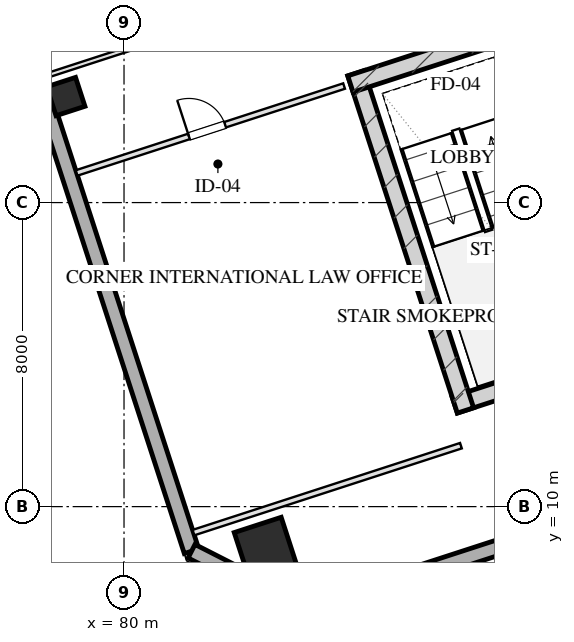
"""IFC4 building model, lengths in metres.
Left out: names, types, materials, properties, quantities, classifications, styles, units other than length and angle.
Written with IfcOpenShell. Run it as: python <this file> out.ifc"""

import sys

from ifc_helpers import new_model, si_unit, direction, frame, frame_2d, origin, origin_2d, place, context, subcontext, project, spatial, rectangle, hollow_rectangle, extrude, element, fill, save


model = new_model("IFC4")
c1 = context("Model", 3, precision=1e-05, world=origin(), true_north=direction((0.0, 1.0)))
c2 = subcontext(c1, "Body", "Model", "MODEL_VIEW")
j1 = project(units=[si_unit("LENGTHUNIT", "METRE"), si_unit("PLANEANGLEUNIT", "RADIAN")], contexts=[c1])
p1 = place(None, origin())
s1 = spatial("IfcSite", under=j1, at=p1, CompositionType="ELEMENT")
p2 = place(p1, origin())
s2 = spatial("IfcBuilding", under=s1, at=p2, CompositionType="ELEMENT")
p3 = place(p2, frame((0.0, 0.0, 192.05)))
s3 = spatial("IfcBuildingStorey", under=s2, at=p3, CompositionType="ELEMENT", Elevation=192.05)
p4 = place(p3, frame((88.701, 12.675, 0.0), z_axis=(0.0, 0.0, 1.0), x_axis=(0.95105824505, 0.309011673763, 0.0)))
e1 = element("IfcWall", 1, at=p4, inside=s3, PredefinedType="SHEAR", context=c2, shape_type="SweptSolid", body=[
    extrude(rectangle(XDim=16.25, YDim=0.45, at=frame_2d((8.125, 0.0))), origin(), (0.0, 0.0, 1.0), 3.45),
])
p5 = place(p3, frame((86.102, 21.404, 0.0), z_axis=(0.0, 0.0, 1.0), x_axis=(0.309035778627, -0.951050412717, 0.0)))
e2 = element("IfcWall", 2, at=p5, inside=s3, PredefinedType="SHEAR", context=c2, shape_type="SweptSolid", body=[
    extrude(rectangle(XDim=9.33, YDim=0.45, at=frame_2d((4.665, 0.0))), origin(), (0.0, 0.0, 1.0), 3.45),
])
p6 = place(p3, frame((85.957, 21.12, 0.0), z_axis=(0.0, 0.0, 1.0), x_axis=(0.951064796122, 0.308991510526, 0.0)))
e3 = element("IfcWall", 3, at=p6, inside=s3, PredefinedType="SHEAR", context=c2, shape_type="SweptSolid", body=[
    extrude(rectangle(XDim=4.145, YDim=0.45, at=frame_2d((2.073, 0.0))), origin(), (0.0, 0.0, 1.0), 3.45),
])
p7 = place(p3, frame((83.719, 8.901, 0.0), z_axis=(0.0, 0.0, 1.0), x_axis=(0.951056516295, 0.309016994375, 0.0)))
e4 = element("IfcColumn", 4, at=p7, inside=s3, PredefinedType="COLUMN", context=c2, shape_type="SweptSolid", body=[
    extrude(hollow_rectangle(XDim=1.3, YDim=1.3, WallThickness=0.045, at=origin_2d()), origin(), (0.0, 0.0, 1.0), 3.451),
])
p8 = place(p3, frame((78.468, 20.79, 0.0), z_axis=(0.0, 0.0, 1.0), x_axis=(0.951056516295, 0.309016994375, 0.0)))
e5 = element("IfcColumn", 5, at=p8, inside=s3, PredefinedType="COLUMN", context=c2, shape_type="SweptSolid", body=[
    extrude(hollow_rectangle(XDim=0.8, YDim=0.8, WallThickness=0.028, at=origin_2d()), origin(), (0.0, 0.0, 1.0), 3.451),
])
p9 = place(p3, frame((81.776, 8.827, 0.0), z_axis=(0.0, 0.0, 1.0), x_axis=(-0.309014228706, 0.951057414911, 0.0)))
e6 = element("IfcWall", 6, at=p9, inside=s3, PredefinedType="SOLIDWALL", context=c2, shape_type="SweptSolid", body=[
    extrude(rectangle(XDim=42.8, YDim=0.4, at=frame_2d((21.4, 0.0))), origin(), (0.0, 0.0, 1.0), 2.61),
])
p10 = place(p9, frame((13.95, 0.0, 0.75)))
e7 = element("IfcOpeningElement", 7, at=p10, cuts=e6, PredefinedType="OPENING", context=c2, shape_type="SweptSolid", body=[
    extrude(rectangle(XDim=2.1, YDim=1.46, at=frame_2d((1.05, 0.73))), frame((0.0, 0.21, 0.0), z_axis=(0.0, -1.0, 0.0), x_axis=(1.0, 0.0, 0.0)), (0.0, 0.0, 1.0), 0.42),
])
p11 = place(p9, frame((17.75, 0.0, 0.75)))
e8 = element("IfcOpeningElement", 8, at=p11, cuts=e6, PredefinedType="OPENING", context=c2, shape_type="SweptSolid", body=[
    extrude(rectangle(XDim=2.1, YDim=1.46, at=frame_2d((1.05, 0.73))), frame((0.0, 0.21, 0.0), z_axis=(0.0, -1.0, 0.0), x_axis=(1.0, 0.0, 0.0)), (0.0, 0.0, 1.0), 0.42),
])
p12 = place(p9, frame((22.95, 0.0, 0.75)))
e9 = element("IfcOpeningElement", 9, at=p12, cuts=e6, PredefinedType="OPENING", context=c2, shape_type="SweptSolid", body=[
    extrude(rectangle(XDim=2.1, YDim=1.46, at=frame_2d((1.05, 0.73))), frame((0.0, 0.21, 0.0), z_axis=(0.0, -1.0, 0.0), x_axis=(1.0, 0.0, 0.0)), (0.0, 0.0, 1.0), 0.42),
])
p13 = place(p9, frame((26.75, 0.0, 0.75)))
e10 = element("IfcOpeningElement", 10, at=p13, cuts=e6, PredefinedType="OPENING", context=c2, shape_type="SweptSolid", body=[
    extrude(rectangle(XDim=2.1, YDim=1.46, at=frame_2d((1.05, 0.73))), frame((0.0, 0.21, 0.0), z_axis=(0.0, -1.0, 0.0), x_axis=(1.0, 0.0, 0.0)), (0.0, 0.0, 1.0), 0.42),
])
p14 = place(p3, frame((109.908, 15.444, 0.0), z_axis=(0.0, 0.0, 1.0), x_axis=(-0.951057580055, -0.30901372044, 0.0)))
e11 = element("IfcWall", 11, at=p14, inside=s3, PredefinedType="SOLIDWALL", context=c2, shape_type="SweptSolid", body=[
    extrude(rectangle(XDim=26.4, YDim=0.4, at=frame_2d((13.2, 0.0))), origin(), (0.0, 0.0, 1.0), 2.61),
])
p15 = place(p3, frame((84.801, 7.286, 0.0), z_axis=(0.0, 0.0, 1.0), x_axis=(-0.891020832027, 0.453962417932, 0.0)))
e12 = element("IfcWall", 12, at=p15, inside=s3, PredefinedType="SOLIDWALL", context=c2, shape_type="SweptSolid", body=[
    extrude(rectangle(XDim=3.394, YDim=0.4, at=frame_2d((1.697, 0.0))), origin(), (0.0, 0.0, 1.0), 2.61),
])
p16 = place(p3, frame((81.828, 9.316, 0.0), z_axis=(0.0, 0.0, 1.0), x_axis=(0.95105128112, 0.309033106124, 0.0)))
e13 = element("IfcWall", 13, at=p16, inside=s3, PredefinedType="PARTITIONING", context=c2, shape_type="SweptSolid", body=[
    extrude(rectangle(XDim=7.4, YDim=0.15, at=frame_2d((3.7, 0.0))), origin(), (0.0, 0.0, 1.0), 3.175),
])
p17 = place(p3, frame((78.753, 18.78, 0.0), z_axis=(0.0, 0.0, 1.0), x_axis=(0.951060977215, 0.309003264738, 0.0)))
e14 = element("IfcWall", 14, at=p17, inside=s3, PredefinedType="PARTITIONING", context=c2, shape_type="SweptSolid", body=[
    extrude(rectangle(XDim=7.4, YDim=0.15, at=frame_2d((3.7, 0.0))), origin(), (0.0, 0.0, 1.0), 3.175),
])
p18 = place(p17, frame((3.108, 0.0, 0.0)))
e15 = element("IfcOpeningElement", 15, at=p18, cuts=e14, PredefinedType="OPENING", context=c2, shape_type="SweptSolid", body=[
    extrude(rectangle(XDim=1.0, YDim=2.05, at=frame_2d((0.5, 1.025))), frame((0.0, 0.085, 0.0), z_axis=(0.0, -1.0, 0.0), x_axis=(1.0, 0.0, 0.0)), (0.0, 0.0, 1.0), 0.17),
])
p19 = place(p3, frame((77.925, 21.328, 0.0), z_axis=(0.0, 0.0, 1.0), x_axis=(0.951053980838, 0.309024797601, 0.0)))
e16 = element("IfcWall", 16, at=p19, inside=s3, PredefinedType="PARTITIONING", context=c2, shape_type="SweptSolid", body=[
    extrude(rectangle(XDim=9.55, YDim=0.12, at=frame_2d((4.775, 0.0))), origin(), (0.0, 0.0, 1.0), 3.175),
])
p20 = place(p18, origin())
e17 = element("IfcDoor", 17, at=p20, inside=s3, OperationType="SINGLE_SWING_LEFT", PredefinedType="DOOR", context=c2, shape_type="SweptSolid", body=[
    extrude(rectangle(XDim=1.0, YDim=2.05, at=frame_2d((0.5, 1.025))), frame((0.0, 0.025, 0.0), z_axis=(0.0, -1.0, 0.0), x_axis=(1.0, 0.0, 0.0)), (0.0, 0.0, 1.0), 0.05),
])
fill(e15, e17)
save(model, sys.argv[1])
